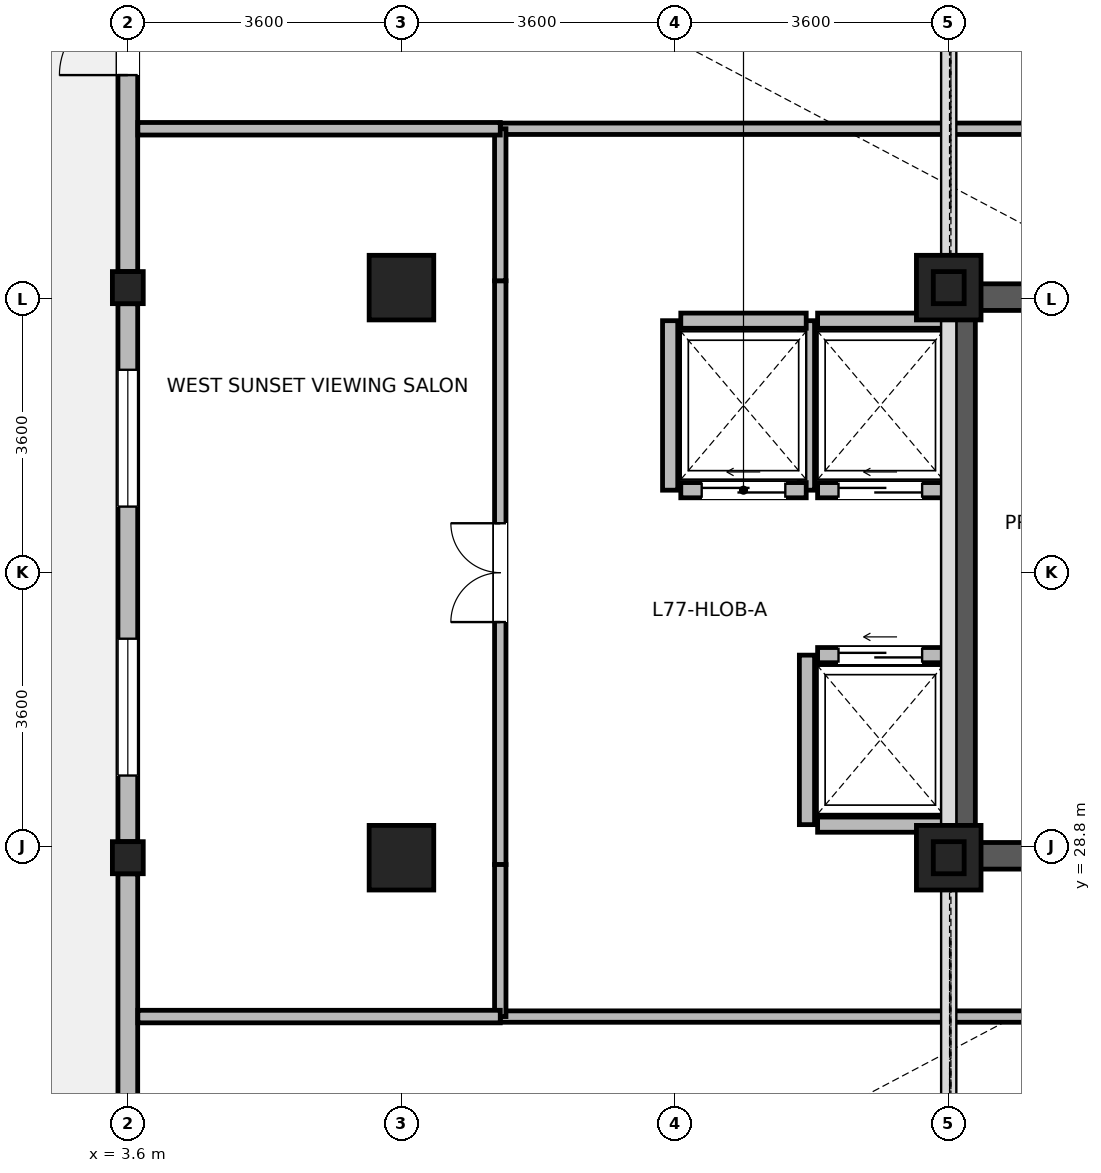
"""IFC4 building model, lengths in metres.
Left out: names, types, materials, properties, quantities, classifications, styles, units other than length and angle.
Written with IfcOpenShell. Run it as: python <this file> out.ifc"""

import sys

from ifc_helpers import new_model, si_unit, direction, frame, frame_2d, origin, origin_2d, place, context, subcontext, project, spatial, rectangle, i_section, extrude, source, transform, mapped, element, fill, save


model = new_model("IFC4")
c1 = context("Model", 3, precision=1e-05, world=origin(), true_north=direction((0.0, 1.0)))
c2 = subcontext(c1, "Body", "Model", "MODEL_VIEW")
j1 = project(units=[si_unit("LENGTHUNIT", "METRE"), si_unit("PLANEANGLEUNIT", "RADIAN")], contexts=[c1])
p1 = place(None, origin())
s1 = spatial("IfcSite", under=j1, at=p1, CompositionType="ELEMENT")
p2 = place(p1, origin())
s2 = spatial("IfcBuilding", under=s1, at=p2, CompositionType="ELEMENT")
p3 = place(p2, frame((0.0, 0.0, 298.0)))
s3 = spatial("IfcBuildingStorey", under=s2, at=p3, CompositionType="ELEMENT", Elevation=298.0)
p4 = place(p3, frame((14.575, 28.5, 0.0), z_axis=(0.0, 0.0, 1.0), x_axis=(0.0, 1.0, 0.0)))
e1 = element("IfcWall", 1, at=p4, inside=s3, PredefinedType="SHEAR", context=c2, shape_type="SweptSolid", body=[
    extrude(rectangle(XDim=7.7, YDim=0.35, at=frame_2d((3.85, 0.0))), origin(), (0.0, 0.0, 1.0), 6.0),
])
for number, where, z_axis, x_axis in (
    (2, (14.75, 28.675, 0.0), (0.0, 0.0, 1.0), (1.0, 0.0, 0.0)),
    (3, (14.75, 36.025, 0.0), (0.0, 0.0, 1.0), (1.0, 0.0, 0.0)),
):
    element("IfcWall", number, at=place(p3, frame(where, z_axis=z_axis, x_axis=x_axis)), inside=s3, PredefinedType="SHEAR", context=c2, shape_type="SweptSolid", body=[
        extrude(rectangle(XDim=3.2, YDim=0.35, at=frame_2d((1.6, 0.0))), origin(), (0.0, 0.0, 1.0), 6.0),
    ])
m1 = source(origin(), c2, "Body", "SweptSolid", [
    extrude(rectangle(XDim=0.85, YDim=0.85, at=origin_2d()), origin(), (0.0, 0.0, 1.0), 6.0),
])
for number, where, z_axis, x_axis in (
    (4, (7.2, 28.65, 0.0), (0.0, 0.0, 1.0), (1.0, 0.0, 0.0)),
    (5, (7.2, 36.15, 0.0), (0.0, 0.0, 1.0), (1.0, 0.0, 0.0)),
    (6, (14.4, 28.65, 0.0), (0.0, 0.0, 1.0), (1.0, 0.0, 0.0)),
    (7, (14.4, 36.15, 0.0), (0.0, 0.0, 1.0), (1.0, 0.0, 0.0)),
):
    element("IfcColumn", number, at=place(p3, frame(where, z_axis=z_axis, x_axis=x_axis)), inside=s3, PredefinedType="COLUMN", context=c2, shape_type="MappedRepresentation", body=[
        mapped(m1, transform((0.0, 0.0, 0.0), x_axis=(1.0, 0.0, 0.0), y_axis=(0.0, 1.0, 0.0), z_axis=(0.0, 0.0, 1.0), scale=1.0)),
    ])
m2 = source(origin(), c2, "Body", "SweptSolid", [
    extrude(i_section(OverallWidth=0.406, OverallDepth=0.422, WebThickness=0.023, FlangeThickness=0.031, FilletRadius=0.015, at=origin_2d()), origin(), (0.0, 0.0, 1.0), 6.0),
])
for number, where, z_axis, x_axis in (
    (8, (3.6, 28.65, 0.0), (0.0, 0.0, 1.0), (1.0, 0.0, 0.0)),
    (9, (3.6, 36.15, 0.0), (0.0, 0.0, 1.0), (1.0, 0.0, 0.0)),
):
    element("IfcColumn", number, at=place(p3, frame(where, z_axis=z_axis, x_axis=x_axis)), inside=s3, PredefinedType="COLUMN", context=c2, shape_type="MappedRepresentation", body=[
        mapped(m2, transform((0.0, 0.0, 0.0), x_axis=(1.0, 0.0, 0.0), y_axis=(0.0, 1.0, 0.0), z_axis=(0.0, 0.0, 1.0), scale=1.0)),
    ])
m3 = source(origin(), c2, "Body", "SweptSolid", [
    extrude(i_section(OverallWidth=0.406, OverallDepth=0.422, WebThickness=0.023, FlangeThickness=0.031, FilletRadius=0.015, at=origin_2d()), origin(), (0.0, 0.0, 1.0), 28.41),
])
for number, where, z_axis, x_axis in (
    (10, (14.4, 28.65, 6.0), (0.0, 0.0, 1.0), (1.0, 0.0, 0.0)),
    (11, (14.4, 36.15, 6.0), (0.0, 0.0, 1.0), (1.0, 0.0, 0.0)),
):
    element("IfcColumn", number, at=place(p3, frame(where, z_axis=z_axis, x_axis=x_axis)), inside=s3, PredefinedType="COLUMN", context=c2, shape_type="MappedRepresentation", body=[
        mapped(m3, transform((0.0, 0.0, 0.0), x_axis=(1.0, 0.0, 0.0), y_axis=(0.0, 1.0, 0.0), z_axis=(0.0, 0.0, 1.0), scale=1.0)),
    ])
p5 = place(p3, frame((3.6, 36.362, 0.0), z_axis=(0.0, 0.0, 1.0), x_axis=(0.0, 1.0, 0.0)))
e12 = element("IfcWall", 12, at=p5, inside=s3, PredefinedType="STANDARD", context=c2, shape_type="SweptSolid", body=[
    extrude(rectangle(XDim=6.968, YDim=0.26, at=frame_2d((3.484, 0.0))), origin(), (0.0, 0.0, 1.0), 5.9),
])
p6 = place(p5, frame((2.584, 0.0, 0.0)))
e13 = element("IfcOpeningElement", 13, at=p6, cuts=e12, PredefinedType="OPENING", context=c2, shape_type="SweptSolid", body=[
    extrude(rectangle(XDim=1.8, YDim=2.2, at=frame_2d((0.9, 1.1))), frame((0.0, 0.14, 0.0), z_axis=(0.0, -1.0, 0.0), x_axis=(1.0, 0.0, 0.0)), (0.0, 0.0, 1.0), 0.28),
])
p7 = place(p3, frame((3.6, 28.862, 0.0), z_axis=(0.0, 0.0, 1.0), x_axis=(0.0, 1.0, 0.0)))
e14 = element("IfcWall", 14, at=p7, inside=s3, PredefinedType="STANDARD", context=c2, shape_type="SweptSolid", body=[
    extrude(rectangle(XDim=7.076, YDim=0.26, at=frame_2d((3.538, 0.0))), origin(), (0.0, 0.0, 1.0), 5.58),
])
p8 = place(p7, frame((0.869, 0.0, 0.85)))
e15 = element("IfcOpeningElement", 15, at=p8, cuts=e14, PredefinedType="OPENING", context=c2, shape_type="SweptSolid", body=[
    extrude(rectangle(XDim=1.8, YDim=1.85, at=frame_2d((0.9, 0.925))), frame((0.0, 0.14, 0.0), z_axis=(0.0, -1.0, 0.0), x_axis=(1.0, 0.0, 0.0)), (0.0, 0.0, 1.0), 0.28),
])
p9 = place(p7, frame((4.407, 0.0, 0.85)))
e16 = element("IfcOpeningElement", 16, at=p9, cuts=e14, PredefinedType="OPENING", context=c2, shape_type="SweptSolid", body=[
    extrude(rectangle(XDim=1.8, YDim=1.85, at=frame_2d((0.9, 0.925))), frame((0.0, 0.14, 0.0), z_axis=(0.0, -1.0, 0.0), x_axis=(1.0, 0.0, 0.0)), (0.0, 0.0, 1.0), 0.28),
])
p10 = place(p3, frame((3.6, 20.27, 0.0), z_axis=(0.0, 0.0, 1.0), x_axis=(0.0, 1.0, 0.0)))
e17 = element("IfcWall", 17, at=p10, inside=s3, PredefinedType="STANDARD", context=c2, shape_type="SweptSolid", body=[
    extrude(rectangle(XDim=8.168, YDim=0.26, at=frame_2d((4.084, 0.0))), origin(), (0.0, 0.0, 1.0), 5.9),
])
p11 = place(p10, frame((1.142, 0.0, 0.85)))
e18 = element("IfcOpeningElement", 18, at=p11, cuts=e17, PredefinedType="OPENING", context=c2, shape_type="SweptSolid", body=[
    extrude(rectangle(XDim=1.8, YDim=1.85, at=frame_2d((0.9, 0.925))), frame((0.0, 0.14, 0.0), z_axis=(0.0, -1.0, 0.0), x_axis=(1.0, 0.0, 0.0)), (0.0, 0.0, 1.0), 0.28),
])
p12 = place(p10, frame((3.609, 0.0, 0.85)))
e19 = element("IfcOpeningElement", 19, at=p12, cuts=e17, PredefinedType="OPENING", context=c2, shape_type="SweptSolid", body=[
    extrude(rectangle(XDim=0.95, YDim=1.75, at=frame_2d((0.475, 0.875))), frame((0.0, 0.14, 0.0), z_axis=(0.0, -1.0, 0.0), x_axis=(1.0, 0.0, 0.0)), (0.0, 0.0, 1.0), 0.28),
])
p13 = place(p3, frame((12.675, 33.485, 0.0), z_axis=(0.0, 0.0, 1.0), x_axis=(1.0, 0.0, 0.0)))
e20 = element("IfcWall", 20, at=p13, inside=s3, PredefinedType="PARTITIONING", context=c2, shape_type="SweptSolid", body=[
    extrude(rectangle(XDim=1.65, YDim=0.2, at=frame_2d((0.825, 0.0))), origin(), (0.0, 0.0, 1.0), 5.9),
])
p14 = place(p13, frame((0.275, 0.0, 0.0)))
e21 = element("IfcOpeningElement", 21, at=p14, cuts=e20, PredefinedType="OPENING", context=c2, shape_type="SweptSolid", body=[
    extrude(rectangle(XDim=1.1, YDim=2.12, at=frame_2d((0.55, 1.06))), frame((0.0, 0.11, 0.0), z_axis=(0.0, -1.0, 0.0), x_axis=(1.0, 0.0, 0.0)), (0.0, 0.0, 1.0), 0.22),
])
p15 = place(p3, frame((12.675, 35.715, 0.0), z_axis=(0.0, 0.0, 1.0), x_axis=(1.0, 0.0, 0.0)))
e22 = element("IfcWall", 22, at=p15, inside=s3, PredefinedType="PARTITIONING", context=c2, shape_type="SweptSolid", body=[
    extrude(rectangle(XDim=1.65, YDim=0.2, at=frame_2d((0.825, 0.0))), origin(), (0.0, 0.0, 1.0), 5.9),
])
p16 = place(p3, frame((12.535, 33.485, 0.0), z_axis=(0.0, 0.0, 1.0), x_axis=(0.0, 1.0, 0.0)))
e23 = element("IfcWall", 23, at=p16, inside=s3, PredefinedType="PARTITIONING", context=c2, shape_type="SweptSolid", body=[
    extrude(rectangle(XDim=2.23, YDim=0.2, at=frame_2d((1.115, 0.0))), origin(), (0.0, 0.0, 1.0), 5.9),
])
p17 = place(p3, frame((12.675, 29.085, 0.0), z_axis=(0.0, 0.0, 1.0), x_axis=(1.0, 0.0, 0.0)))
e24 = element("IfcWall", 24, at=p17, inside=s3, PredefinedType="PARTITIONING", context=c2, shape_type="SweptSolid", body=[
    extrude(rectangle(XDim=1.65, YDim=0.2, at=frame_2d((0.825, 0.0))), origin(), (0.0, 0.0, 1.0), 5.9),
])
p18 = place(p3, frame((12.675, 31.315, 0.0), z_axis=(0.0, 0.0, 1.0), x_axis=(1.0, 0.0, 0.0)))
e25 = element("IfcWall", 25, at=p18, inside=s3, PredefinedType="PARTITIONING", context=c2, shape_type="SweptSolid", body=[
    extrude(rectangle(XDim=1.65, YDim=0.2, at=frame_2d((0.825, 0.0))), origin(), (0.0, 0.0, 1.0), 5.9),
])
p19 = place(p18, frame((0.275, 0.0, 0.0)))
e26 = element("IfcOpeningElement", 26, at=p19, cuts=e25, PredefinedType="OPENING", context=c2, shape_type="SweptSolid", body=[
    extrude(rectangle(XDim=1.1, YDim=2.12, at=frame_2d((0.55, 1.06))), frame((0.0, 0.11, 0.0), z_axis=(0.0, -1.0, 0.0), x_axis=(1.0, 0.0, 0.0)), (0.0, 0.0, 1.0), 0.22),
])
p20 = place(p3, frame((12.535, 29.085, 0.0), z_axis=(0.0, 0.0, 1.0), x_axis=(0.0, 1.0, 0.0)))
e27 = element("IfcWall", 27, at=p20, inside=s3, PredefinedType="PARTITIONING", context=c2, shape_type="SweptSolid", body=[
    extrude(rectangle(XDim=2.23, YDim=0.2, at=frame_2d((1.115, 0.0))), origin(), (0.0, 0.0, 1.0), 5.9),
])
p21 = place(p3, frame((10.875, 33.485, 0.0), z_axis=(0.0, 0.0, 1.0), x_axis=(1.0, 0.0, 0.0)))
e28 = element("IfcWall", 28, at=p21, inside=s3, PredefinedType="PARTITIONING", context=c2, shape_type="SweptSolid", body=[
    extrude(rectangle(XDim=1.65, YDim=0.2, at=frame_2d((0.825, 0.0))), origin(), (0.0, 0.0, 1.0), 5.9),
])
p22 = place(p21, frame((0.275, 0.0, 0.0)))
e29 = element("IfcOpeningElement", 29, at=p22, cuts=e28, PredefinedType="OPENING", context=c2, shape_type="SweptSolid", body=[
    extrude(rectangle(XDim=1.1, YDim=2.12, at=frame_2d((0.55, 1.06))), frame((0.0, 0.11, 0.0), z_axis=(0.0, -1.0, 0.0), x_axis=(1.0, 0.0, 0.0)), (0.0, 0.0, 1.0), 0.22),
])
p23 = place(p3, frame((10.875, 35.715, 0.0), z_axis=(0.0, 0.0, 1.0), x_axis=(1.0, 0.0, 0.0)))
e30 = element("IfcWall", 30, at=p23, inside=s3, PredefinedType="PARTITIONING", context=c2, shape_type="SweptSolid", body=[
    extrude(rectangle(XDim=1.65, YDim=0.2, at=frame_2d((0.825, 0.0))), origin(), (0.0, 0.0, 1.0), 5.9),
])
p24 = place(p3, frame((10.735, 33.485, 0.0), z_axis=(0.0, 0.0, 1.0), x_axis=(0.0, 1.0, 0.0)))
e31 = element("IfcWall", 31, at=p24, inside=s3, PredefinedType="PARTITIONING", context=c2, shape_type="SweptSolid", body=[
    extrude(rectangle(XDim=2.23, YDim=0.2, at=frame_2d((1.115, 0.0))), origin(), (0.0, 0.0, 1.0), 5.9),
])
p25 = place(p3, frame((8.5, 38.24, 0.0), z_axis=(0.0, 0.0, 1.0), x_axis=(1.0, 0.0, 0.0)))
e32 = element("IfcWall", 32, at=p25, inside=s3, PredefinedType="PARTITIONING", context=c2, shape_type="SweptSolid", body=[
    extrude(rectangle(XDim=25.5, YDim=0.15, at=frame_2d((12.75, 0.0))), origin(), (0.0, 0.0, 1.0), 5.9),
])
p26 = place(p25, frame((12.1, 0.0, 0.0)))
e33 = element("IfcOpeningElement", 33, at=p26, cuts=e32, PredefinedType="OPENING", context=c2, shape_type="SweptSolid", body=[
    extrude(rectangle(XDim=1.3, YDim=2.12, at=frame_2d((0.65, 1.06))), frame((0.0, 0.085, 0.0), z_axis=(0.0, -1.0, 0.0), x_axis=(1.0, 0.0, 0.0)), (0.0, 0.0, 1.0), 0.17),
])
p27 = place(p3, frame((8.5, 26.56, 0.0), z_axis=(0.0, 0.0, 1.0), x_axis=(1.0, 0.0, 0.0)))
e34 = element("IfcWall", 34, at=p27, inside=s3, PredefinedType="PARTITIONING", context=c2, shape_type="SweptSolid", body=[
    extrude(rectangle(XDim=23.5, YDim=0.15, at=frame_2d((11.75, 0.0))), origin(), (0.0, 0.0, 1.0), 5.9),
])
p28 = place(p27, frame((11.1, 0.0, 0.0)))
e35 = element("IfcOpeningElement", 35, at=p28, cuts=e34, PredefinedType="OPENING", context=c2, shape_type="SweptSolid", body=[
    extrude(rectangle(XDim=1.3, YDim=2.12, at=frame_2d((0.65, 1.06))), frame((0.0, 0.085, 0.0), z_axis=(0.0, -1.0, 0.0), x_axis=(1.0, 0.0, 0.0)), (0.0, 0.0, 1.0), 0.17),
])
p29 = place(p3, frame((8.5, 28.56, 0.0), z_axis=(0.0, 0.0, 1.0), x_axis=(0.0, 1.0, 0.0)))
e36 = element("IfcWall", 36, at=p29, inside=s3, PredefinedType="PARTITIONING", context=c2, shape_type="SweptSolid", body=[
    extrude(rectangle(XDim=7.68, YDim=0.15, at=frame_2d((3.84, 0.0))), origin(), (0.0, 0.0, 1.0), 5.9),
])
p30 = place(p29, frame((3.19, 0.0, 0.0)))
e37 = element("IfcOpeningElement", 37, at=p30, cuts=e36, PredefinedType="OPENING", context=c2, shape_type="SweptSolid", body=[
    extrude(rectangle(XDim=1.3, YDim=2.12, at=frame_2d((0.65, 1.06))), frame((0.0, 0.085, 0.0), z_axis=(0.0, -1.0, 0.0), x_axis=(1.0, 0.0, 0.0)), (0.0, 0.0, 1.0), 0.17),
])
for number, where, z_axis, x_axis in (
    (38, (8.5, 26.56, 0.0), (0.0, 0.0, 1.0), (0.0, 1.0, 0.0)),
    (39, (8.5, 36.24, 0.0), (0.0, 0.0, 1.0), (0.0, 1.0, 0.0)),
):
    element("IfcWall", number, at=place(p3, frame(where, z_axis=z_axis, x_axis=x_axis)), inside=s3, PredefinedType="PARTITIONING", context=c2, shape_type="SweptSolid", body=[
        extrude(rectangle(XDim=2.0, YDim=0.15, at=frame_2d((1.0, 0.0))), origin(), (0.0, 0.0, 1.0), 5.9),
    ])
for number, where, z_axis, x_axis in (
    (40, (3.732, 26.56, 0.0), (0.0, 0.0, 1.0), (1.0, 0.0, 0.0)),
    (41, (3.732, 38.24, 0.0), (0.0, 0.0, 1.0), (1.0, 0.0, 0.0)),
):
    element("IfcWall", number, at=place(p3, frame(where, z_axis=z_axis, x_axis=x_axis)), inside=s3, PredefinedType="PARTITIONING", context=c2, shape_type="SweptSolid", body=[
        extrude(rectangle(XDim=4.768, YDim=0.165, at=frame_2d((2.384, 0.0))), origin(), (0.0, 0.0, 1.0), 5.9),
    ])
p31 = place(p6, origin())
e42 = element("IfcDoor", 42, at=p31, inside=s3, OperationType="DOUBLE_DOOR_SINGLE_SWING", PredefinedType="DOOR", context=c2, shape_type="SweptSolid", body=[
    extrude(rectangle(XDim=1.8, YDim=2.2, at=frame_2d((0.9, 1.1))), frame((0.0, 0.025, 0.0), z_axis=(0.0, -1.0, 0.0), x_axis=(1.0, 0.0, 0.0)), (0.0, 0.0, 1.0), 0.05),
])
fill(e13, e42)
p32 = place(p8, origin())
e43 = element("IfcWindow", 43, at=p32, inside=s3, PartitioningType="SINGLE_PANEL", PredefinedType="WINDOW", context=c2, shape_type="SweptSolid", body=[
    extrude(rectangle(XDim=1.8, YDim=1.85, at=frame_2d((0.9, 0.925))), frame((0.0, 0.03, 0.0), z_axis=(0.0, -1.0, 0.0), x_axis=(1.0, 0.0, 0.0)), (0.0, 0.0, 1.0), 0.06),
])
fill(e15, e43)
p33 = place(p9, origin())
e44 = element("IfcWindow", 44, at=p33, inside=s3, PartitioningType="SINGLE_PANEL", PredefinedType="WINDOW", context=c2, shape_type="SweptSolid", body=[
    extrude(rectangle(XDim=1.8, YDim=1.85, at=frame_2d((0.9, 0.925))), frame((0.0, 0.03, 0.0), z_axis=(0.0, -1.0, 0.0), x_axis=(1.0, 0.0, 0.0)), (0.0, 0.0, 1.0), 0.06),
])
fill(e16, e44)
p34 = place(p14, origin())
e45 = element("IfcDoor", 45, at=p34, inside=s3, OperationType="SLIDING_TO_LEFT", PredefinedType="DOOR", context=c2, shape_type="SweptSolid", body=[
    extrude(rectangle(XDim=1.1, YDim=2.12, at=frame_2d((0.55, 1.06))), frame((0.0, 0.025, 0.0), z_axis=(0.0, -1.0, 0.0), x_axis=(1.0, 0.0, 0.0)), (0.0, 0.0, 1.0), 0.05),
])
fill(e21, e45)
p35 = place(p19, origin())
e46 = element("IfcDoor", 46, at=p35, inside=s3, OperationType="SLIDING_TO_LEFT", PredefinedType="DOOR", context=c2, shape_type="SweptSolid", body=[
    extrude(rectangle(XDim=1.1, YDim=2.12, at=frame_2d((0.55, 1.06))), frame((0.0, 0.025, 0.0), z_axis=(0.0, -1.0, 0.0), x_axis=(1.0, 0.0, 0.0)), (0.0, 0.0, 1.0), 0.05),
])
fill(e26, e46)
p36 = place(p22, origin())
e47 = element("IfcDoor", 47, at=p36, inside=s3, OperationType="SLIDING_TO_LEFT", PredefinedType="DOOR", context=c2, shape_type="SweptSolid", body=[
    extrude(rectangle(XDim=1.1, YDim=2.12, at=frame_2d((0.55, 1.06))), frame((0.0, 0.025, 0.0), z_axis=(0.0, -1.0, 0.0), x_axis=(1.0, 0.0, 0.0)), (0.0, 0.0, 1.0), 0.05),
])
fill(e29, e47)
p37 = place(p30, origin())
e48 = element("IfcDoor", 48, at=p37, inside=s3, OperationType="DOUBLE_DOOR_SINGLE_SWING", PredefinedType="DOOR", context=c2, shape_type="SweptSolid", body=[
    extrude(rectangle(XDim=1.3, YDim=2.12, at=frame_2d((0.65, 1.06))), frame((0.0, 0.025, 0.0), z_axis=(0.0, -1.0, 0.0), x_axis=(1.0, 0.0, 0.0)), (0.0, 0.0, 1.0), 0.05),
])
fill(e37, e48)
save(model, sys.argv[1])
